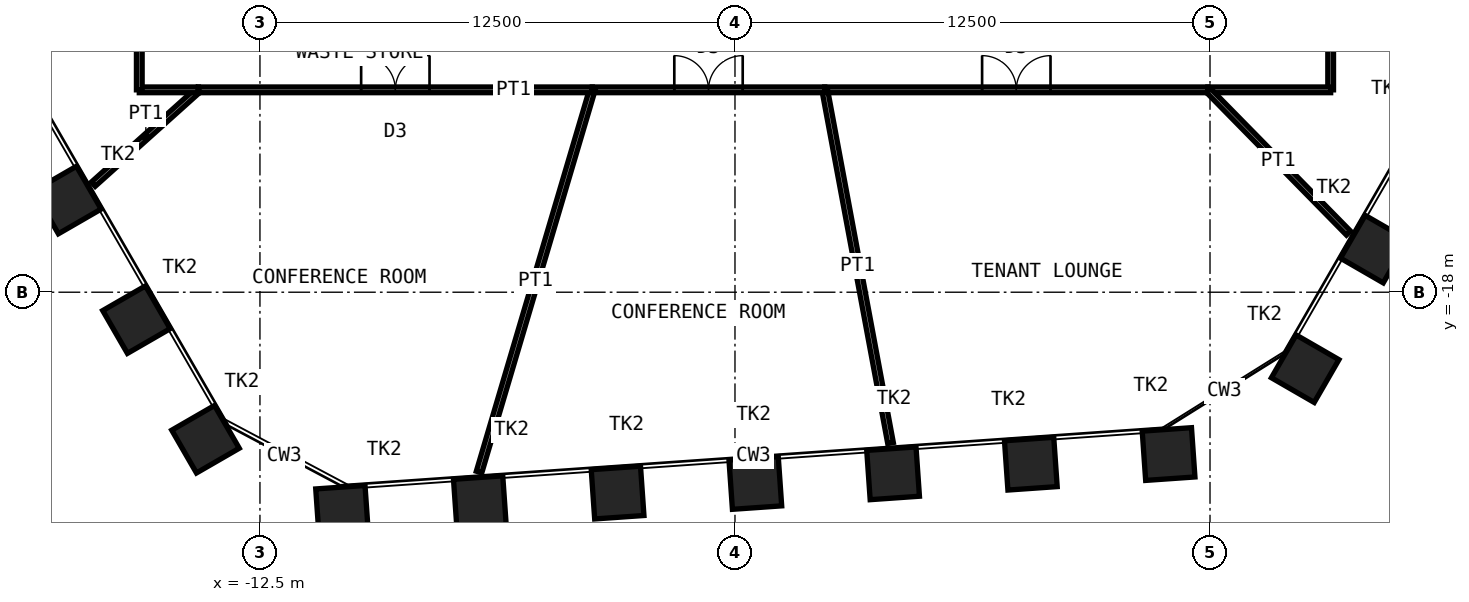
"""IFC4 building model, lengths in metres.
Left out: names, types, materials, properties, quantities, classifications, styles, units other than length and angle.
Written with IfcOpenShell. Run it as: python <this file> out.ifc"""

import sys

from ifc_helpers import new_model, si_unit, direction, frame, frame_2d, origin, origin_2d, place, context, subcontext, project, spatial, rectangle, hollow_rectangle, extrude, element, fill, save


model = new_model("IFC4")
c1 = context("Model", 3, precision=1e-05, world=origin(), true_north=direction((0.0, 1.0)))
c2 = subcontext(c1, "Body", "Model", "MODEL_VIEW")
j1 = project(units=[si_unit("LENGTHUNIT", "METRE"), si_unit("PLANEANGLEUNIT", "RADIAN")], contexts=[c1])
p1 = place(None, origin())
s1 = spatial("IfcSite", under=j1, at=p1, CompositionType="ELEMENT")
p2 = place(p1, origin())
s2 = spatial("IfcBuilding", under=s1, at=p2, CompositionType="ELEMENT")
p3 = place(p2, frame((0.0, 0.0, 180.4)))
s3 = spatial("IfcBuildingStorey", under=s2, at=p3, CompositionType="ELEMENT", Elevation=180.4)
for number, where, z_axis, x_axis in (
    (1, (16.821, -16.866, 0.0), (0.0, 0.0, 1.0), (0.5, 0.866, 0.0)),
    (2, (15.004, -20.012, 0.0), (0.0, 0.0, 1.0), (0.5, 0.866, 0.0)),
    (3, (11.41, -22.258, 0.0), (0.0, 0.0, 1.0), (0.998, 0.07, 0.0)),
    (4, (7.785, -22.512, 0.0), (0.0, 0.0, 1.0), (0.998, 0.07, 0.0)),
    (5, (4.16, -22.765, 0.0), (0.0, 0.0, 1.0), (0.998, 0.07, 0.0)),
    (6, (0.536, -23.019, 0.0), (0.0, 0.0, 1.0), (0.998, 0.07, 0.0)),
    (7, (-3.089, -23.272, 0.0), (0.0, 0.0, 1.0), (0.998, 0.07, 0.0)),
    (8, (-6.714, -23.526, 0.0), (0.0, 0.0, 1.0), (0.998, 0.07, 0.0)),
    (9, (-10.338, -23.779, 0.0), (0.0, 0.0, 1.0), (0.998, 0.07, 0.0)),
    (10, (-13.933, -21.868, 0.0), (0.0, 0.0, 1.0), (0.5, -0.866, 0.0)),
    (11, (-15.749, -18.721, 0.0), (0.0, 0.0, 1.0), (0.5, -0.866, 0.0)),
    (12, (-17.566, -15.574, 0.0), (0.0, 0.0, 1.0), (0.5, -0.866, 0.0)),
):
    element("IfcColumn", number, at=place(p3, frame(where, z_axis=z_axis, x_axis=x_axis)), inside=s3, PredefinedType="COLUMN", context=c2, shape_type="SweptSolid", body=[
        extrude(hollow_rectangle(XDim=1.3, YDim=1.3, WallThickness=0.1, at=origin_2d()), origin(), (0.0, 0.0, 1.0), 4.2),
    ])
p4 = place(p3, frame((15.675, -5.119, 0.0), z_axis=(0.0, 0.0, 1.0), x_axis=(0.0, -1.0, 0.0)))
e13 = element("IfcWall", 13, at=p4, inside=s3, PredefinedType="PARTITIONING", context=c2, shape_type="SweptSolid", body=[
    extrude(rectangle(XDim=7.556, YDim=0.15, at=frame_2d((3.778, 0.0))), origin(), (0.0, 0.0, 1.0), 4.03),
])
p5 = place(p4, frame((2.878, 0.0, 0.0)))
e14 = element("IfcOpeningElement", 14, at=p5, cuts=e13, PredefinedType="OPENING", context=c2, shape_type="SweptSolid", body=[
    extrude(rectangle(XDim=1.8, YDim=2.4, at=frame_2d((0.9, 1.2))), frame((0.0, 0.085, 0.0), z_axis=(0.0, -1.0, 0.0), x_axis=(1.0, 0.0, 0.0)), (0.0, 0.0, 1.0), 0.17),
])
p6 = place(p3, frame((15.675, -12.675, 0.0), z_axis=(0.0, 0.0, 1.0), x_axis=(-1.0, 0.0, 0.0)))
e15 = element("IfcWall", 15, at=p6, inside=s3, PredefinedType="PARTITIONING", context=c2, shape_type="SweptSolid", body=[
    extrude(rectangle(XDim=3.231, YDim=0.15, at=frame_2d((1.616, 0.0))), origin(), (0.0, 0.0, 1.0), 4.03),
])
p7 = place(p3, frame((16.145, -16.444, 0.0), z_axis=(0.0, 0.0, 1.0), x_axis=(-0.700583233902, 0.713570691926, 0.0)))
e16 = element("IfcWall", 16, at=p7, inside=s3, PredefinedType="PARTITIONING", context=c2, shape_type="SweptSolid", body=[
    extrude(rectangle(XDim=5.282, YDim=0.15, at=frame_2d((2.641, 0.0))), origin(), (0.0, 0.0, 1.0), 2.93),
])
p8 = place(p3, frame((12.444, -12.675, 0.0), z_axis=(0.0, 0.0, 1.0), x_axis=(-1.0, 0.0, 0.0)))
e17 = element("IfcWall", 17, at=p8, inside=s3, PredefinedType="PARTITIONING", context=c2, shape_type="SweptSolid", body=[
    extrude(rectangle(XDim=10.082, YDim=0.15, at=frame_2d((5.041, 0.0))), origin(), (0.0, 0.0, 1.0), 4.03),
])
p9 = place(p8, frame((4.141, 0.0, 0.0)))
e18 = element("IfcOpeningElement", 18, at=p9, cuts=e17, PredefinedType="OPENING", context=c2, shape_type="SweptSolid", body=[
    extrude(rectangle(XDim=1.8, YDim=2.4, at=frame_2d((0.9, 1.2))), frame((0.0, 0.085, 0.0), z_axis=(0.0, -1.0, 0.0), x_axis=(1.0, 0.0, 0.0)), (0.0, 0.0, 1.0), 0.17),
])
p10 = place(p3, frame((4.093, -21.969, 0.0), z_axis=(0.0, 0.0, 1.0), x_axis=(-0.183176675572, 0.983080009728, 0.0)))
e19 = element("IfcWall", 19, at=p10, inside=s3, PredefinedType="PARTITIONING", context=c2, shape_type="SweptSolid", body=[
    extrude(rectangle(XDim=9.454, YDim=0.15, at=frame_2d((4.727, 0.0))), origin(), (0.0, 0.0, 1.0), 2.93),
])
p11 = place(p3, frame((2.362, -12.675, 0.0), z_axis=(0.0, 0.0, 1.0), x_axis=(-1.0, 0.0, 0.0)))
e20 = element("IfcWall", 20, at=p11, inside=s3, PredefinedType="PARTITIONING", context=c2, shape_type="SweptSolid", body=[
    extrude(rectangle(XDim=6.116, YDim=0.15, at=frame_2d((3.058, 0.0))), origin(), (0.0, 0.0, 1.0), 4.03),
])
p12 = place(p11, frame((2.158, 0.0, 0.0)))
e21 = element("IfcOpeningElement", 21, at=p12, cuts=e20, PredefinedType="OPENING", context=c2, shape_type="SweptSolid", body=[
    extrude(rectangle(XDim=1.8, YDim=2.4, at=frame_2d((0.9, 1.2))), frame((0.0, 0.085, 0.0), z_axis=(0.0, -1.0, 0.0), x_axis=(1.0, 0.0, 0.0)), (0.0, 0.0, 1.0), 0.17),
])
p13 = place(p3, frame((-6.734, -22.731, 0.0), z_axis=(0.0, 0.0, 1.0), x_axis=(0.284051080164, 0.958809148818, 0.0)))
e22 = element("IfcWall", 22, at=p13, inside=s3, PredefinedType="PARTITIONING", context=c2, shape_type="SweptSolid", body=[
    extrude(rectangle(XDim=10.489, YDim=0.15, at=frame_2d((5.244, 0.0))), origin(), (0.0, 0.0, 1.0), 2.93),
])
p14 = place(p3, frame((-3.755, -12.675, 0.0), z_axis=(0.0, 0.0, 1.0), x_axis=(-1.0, 0.0, 0.0)))
e23 = element("IfcWall", 23, at=p14, inside=s3, PredefinedType="PARTITIONING", context=c2, shape_type="SweptSolid", body=[
    extrude(rectangle(XDim=10.365, YDim=0.15, at=frame_2d((5.183, 0.0))), origin(), (0.0, 0.0, 1.0), 4.03),
])
p15 = place(p14, frame((4.282, 0.0, 0.0)))
e24 = element("IfcOpeningElement", 24, at=p15, cuts=e23, PredefinedType="OPENING", context=c2, shape_type="SweptSolid", body=[
    extrude(rectangle(XDim=1.8, YDim=2.4, at=frame_2d((0.9, 1.2))), frame((0.0, 0.085, 0.0), z_axis=(0.0, -1.0, 0.0), x_axis=(1.0, 0.0, 0.0)), (0.0, 0.0, 1.0), 0.17),
])
p16 = place(p3, frame((-16.885, -15.158, 0.0), z_axis=(0.0, 0.0, 1.0), x_axis=(0.744149337628, 0.668013295757, 0.0)))
e25 = element("IfcWall", 25, at=p16, inside=s3, PredefinedType="PARTITIONING", context=c2, shape_type="SweptSolid", body=[
    extrude(rectangle(XDim=3.717, YDim=0.15, at=frame_2d((1.858, 0.0))), origin(), (0.0, 0.0, 1.0), 2.93),
])
p17 = place(p3, frame((-14.12, -12.675, 0.0), z_axis=(0.0, 0.0, 1.0), x_axis=(-1.0, 0.0, 0.0)))
e26 = element("IfcWall", 26, at=p17, inside=s3, PredefinedType="PARTITIONING", context=c2, shape_type="SweptSolid", body=[
    extrude(rectangle(XDim=1.555, YDim=0.15, at=frame_2d((0.778, 0.0))), origin(), (0.0, 0.0, 1.0), 4.03),
])
p18 = place(p3, frame((-15.675, -12.675, 0.0), z_axis=(0.0, 0.0, 1.0), x_axis=(0.0, 1.0, 0.0)))
e27 = element("IfcWall", 27, at=p18, inside=s3, PredefinedType="PARTITIONING", context=c2, shape_type="SweptSolid", body=[
    extrude(rectangle(XDim=5.877, YDim=0.15, at=frame_2d((2.938, 0.0))), origin(), (0.0, 0.0, 1.0), 4.03),
])
p19 = place(p18, frame((2.438, 0.0, 0.0)))
e28 = element("IfcOpeningElement", 28, at=p19, cuts=e27, PredefinedType="OPENING", context=c2, shape_type="SweptSolid", body=[
    extrude(rectangle(XDim=1.0, YDim=2.4, at=frame_2d((0.5, 1.2))), frame((0.0, 0.085, 0.0), z_axis=(0.0, -1.0, 0.0), x_axis=(1.0, 0.0, 0.0)), (0.0, 0.0, 1.0), 0.17),
])
p20 = place(p9, origin())
e29 = element("IfcDoor", 29, at=p20, inside=s3, OperationType="DOUBLE_DOOR_DOUBLE_SWING", PredefinedType="DOOR", context=c2, shape_type="SweptSolid", body=[
    extrude(rectangle(XDim=1.8, YDim=2.4, at=frame_2d((0.9, 1.2))), frame((0.0, 0.025, 0.0), z_axis=(0.0, -1.0, 0.0), x_axis=(1.0, 0.0, 0.0)), (0.0, 0.0, 1.0), 0.05),
])
fill(e18, e29)
p21 = place(p12, origin())
e30 = element("IfcDoor", 30, at=p21, inside=s3, OperationType="DOUBLE_DOOR_DOUBLE_SWING", PredefinedType="DOOR", context=c2, shape_type="SweptSolid", body=[
    extrude(rectangle(XDim=1.8, YDim=2.4, at=frame_2d((0.9, 1.2))), frame((0.0, 0.025, 0.0), z_axis=(0.0, -1.0, 0.0), x_axis=(1.0, 0.0, 0.0)), (0.0, 0.0, 1.0), 0.05),
])
fill(e21, e30)
p22 = place(p15, origin())
e31 = element("IfcDoor", 31, at=p22, inside=s3, OperationType="DOUBLE_DOOR_DOUBLE_SWING", PredefinedType="DOOR", context=c2, shape_type="SweptSolid", body=[
    extrude(rectangle(XDim=1.8, YDim=2.4, at=frame_2d((0.9, 1.2))), frame((0.0, 0.025, 0.0), z_axis=(0.0, -1.0, 0.0), x_axis=(1.0, 0.0, 0.0)), (0.0, 0.0, 1.0), 0.05),
])
fill(e24, e31)
save(model, sys.argv[1])
